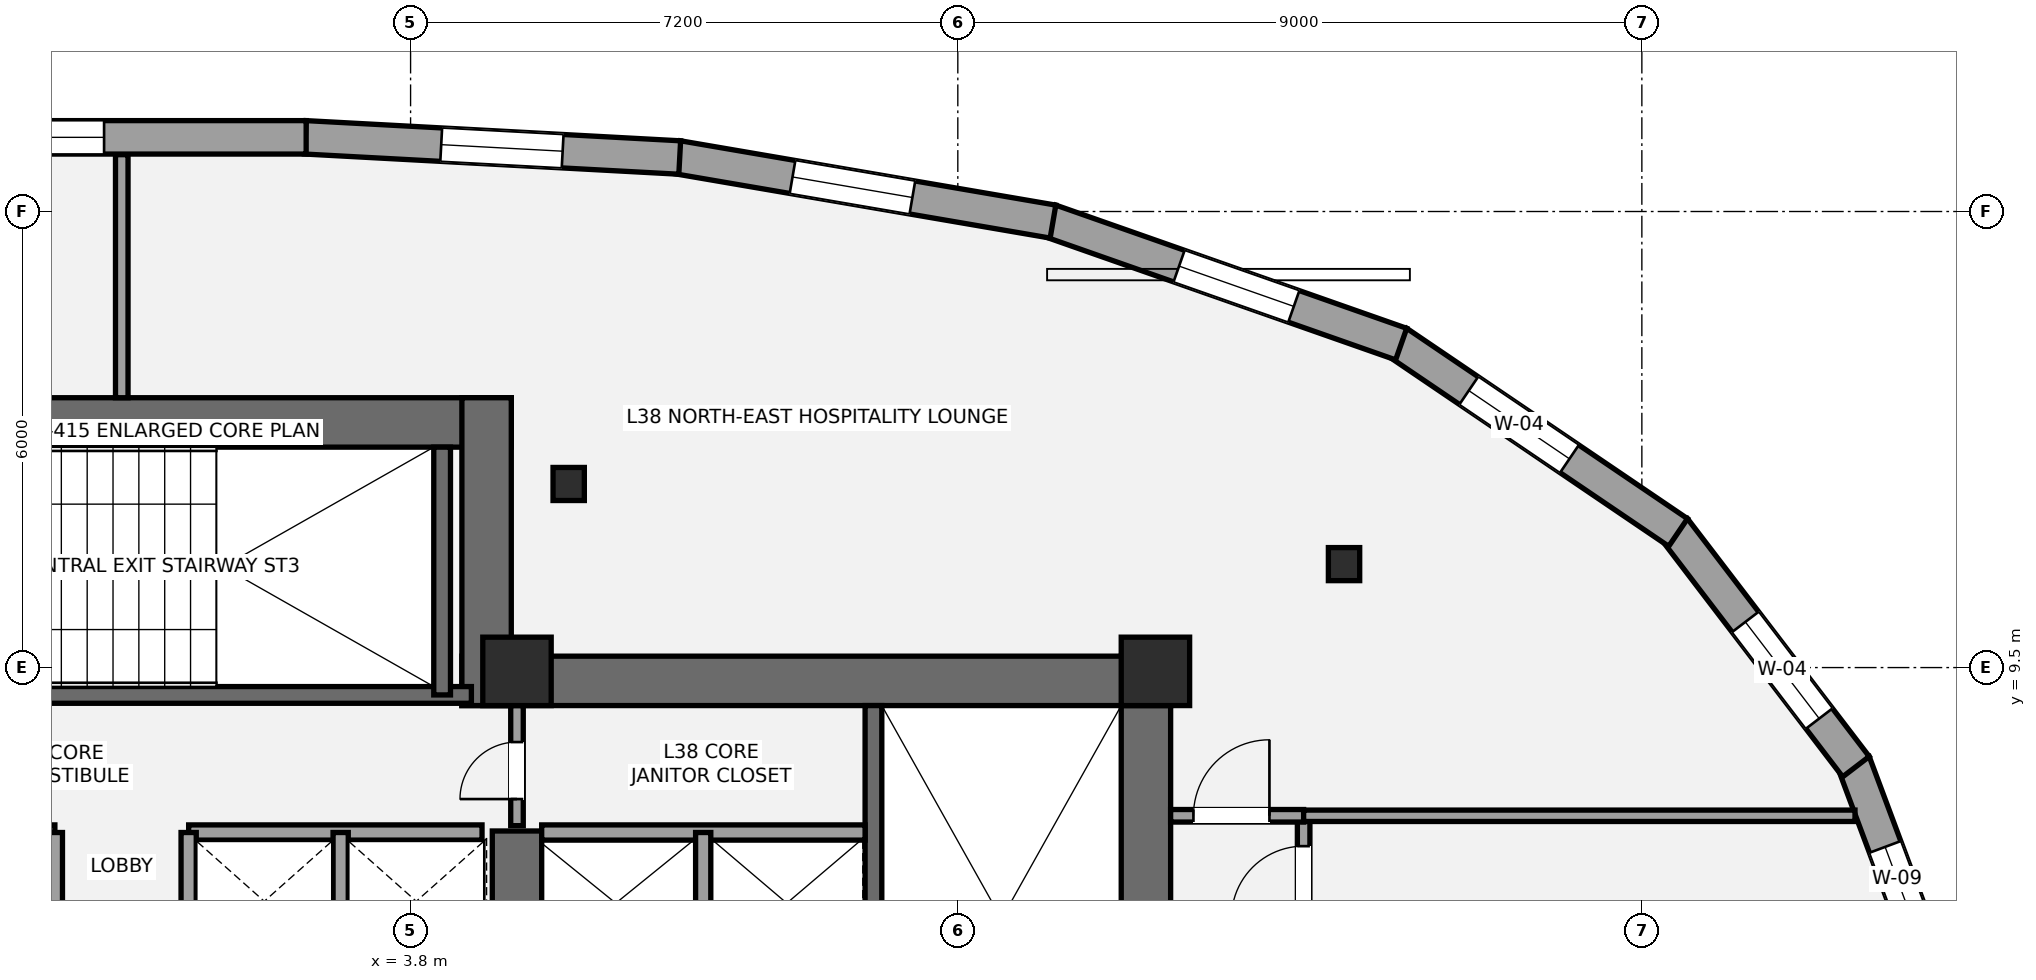
"""IFC4 building model, lengths in metres.
Left out: names, types, materials, properties, quantities, classifications, styles, units other than length and angle.
Written with IfcOpenShell. Run it as: python <this file> out.ifc"""

import sys

from ifc_helpers import new_model, si_unit, direction, frame, frame_2d, origin, origin_2d, place, context, subcontext, project, spatial, rectangle, i_section, extrude, element, fill, save


model = new_model("IFC4")
c1 = context("Model", 3, precision=1e-05, world=origin(), true_north=direction((0.0, 1.0)))
c2 = subcontext(c1, "Body", "Model", "MODEL_VIEW")
j1 = project(units=[si_unit("LENGTHUNIT", "METRE"), si_unit("PLANEANGLEUNIT", "RADIAN")], contexts=[c1])
p1 = place(None, origin())
s1 = spatial("IfcSite", under=j1, at=p1, CompositionType="ELEMENT")
p2 = place(p1, origin())
s2 = spatial("IfcBuilding", under=s1, at=p2, CompositionType="ELEMENT")
p3 = place(p2, frame((0.0, 0.0, 143.8)))
s3 = spatial("IfcBuildingStorey", under=s2, at=p3, CompositionType="ELEMENT", Elevation=143.8)
p4 = place(p3, frame((13.475, 1.2, 0.0), z_axis=(0.0, 0.0, 1.0), x_axis=(0.0, 1.0, 0.0)))
e1 = element("IfcWall", 1, at=p4, inside=s3, PredefinedType="SHEAR", context=c2, shape_type="SweptSolid", body=[
    extrude(rectangle(XDim=8.45, YDim=0.65, at=frame_2d((4.225, 0.0))), origin(), (0.0, 0.0, 1.0), 3.2),
])
p5 = place(p3, frame((4.475, 9.325, 0.0), z_axis=(0.0, 0.0, 1.0), x_axis=(1.0, 0.0, 0.0)))
e2 = element("IfcWall", 2, at=p5, inside=s3, PredefinedType="SHEAR", context=c2, shape_type="SweptSolid", body=[
    extrude(rectangle(XDim=9.325, YDim=0.65, at=frame_2d((4.663, 0.0))), origin(), (0.0, 0.0, 1.0), 3.2),
])
p6 = place(p3, frame((5.2, 5.35, 0.0), z_axis=(0.0, 0.0, 1.0), x_axis=(0.0, 1.0, 0.0)))
e3 = element("IfcWall", 3, at=p6, inside=s3, PredefinedType="SHEAR", context=c2, shape_type="SweptSolid", body=[
    extrude(rectangle(XDim=2.0, YDim=0.65, at=frame_2d((1.0, 0.0))), origin(), (0.0, 0.0, 1.0), 3.2),
])
p7 = place(p3, frame((9.89, 1.85, 0.0), z_axis=(0.0, 0.0, 1.0), x_axis=(0.0, 1.0, 0.0)))
e4 = element("IfcWall", 4, at=p7, inside=s3, PredefinedType="SHEAR", context=c2, shape_type="SweptSolid", body=[
    extrude(rectangle(XDim=7.15, YDim=0.22, at=frame_2d((3.575, 0.0))), origin(), (0.0, 0.0, 1.0), 3.2),
])
p8 = place(p3, frame((-5.125, 12.725, 0.0), z_axis=(0.0, 0.0, 1.0), x_axis=(1.0, 0.0, 0.0)))
e5 = element("IfcWall", 5, at=p8, inside=s3, PredefinedType="SHEAR", context=c2, shape_type="SweptSolid", body=[
    extrude(rectangle(XDim=10.25, YDim=0.65, at=frame_2d((5.125, 0.0))), origin(), (0.0, 0.0, 1.0), 3.2),
])
p9 = place(p3, frame((4.8, 9.0, 0.0), z_axis=(0.0, 0.0, 1.0), x_axis=(0.0, 1.0, 0.0)))
e6 = element("IfcWall", 6, at=p9, inside=s3, PredefinedType="SHEAR", context=c2, shape_type="SweptSolid", body=[
    extrude(rectangle(XDim=4.05, YDim=0.65, at=frame_2d((2.025, 0.0))), origin(), (0.0, 0.0, 1.0), 3.2),
])
p10 = place(p3, frame((-4.7, 9.14, 0.0), z_axis=(0.0, 0.0, 1.0), x_axis=(1.0, 0.0, 0.0)))
e7 = element("IfcWall", 7, at=p10, inside=s3, PredefinedType="SHEAR", context=c2, shape_type="SweptSolid", body=[
    extrude(rectangle(XDim=9.3, YDim=0.22, at=frame_2d((4.65, 0.0))), origin(), (0.0, 0.0, 1.0), 3.2),
])
p11 = place(p10, frame((1.15, 0.0, 0.0)))
e8 = element("IfcOpeningElement", 8, at=p11, cuts=e7, PredefinedType="OPENING", context=c2, shape_type="SweptSolid", body=[
    extrude(rectangle(XDim=1.05, YDim=2.15, at=frame_2d((0.525, 1.075))), frame((0.0, 0.12, 0.0), z_axis=(0.0, -1.0, 0.0), x_axis=(1.0, 0.0, 0.0)), (0.0, 0.0, 1.0), 0.24),
])
p12 = place(p3, frame((4.215, 9.14, 0.0), z_axis=(0.0, 0.0, 1.0), x_axis=(0.0, 1.0, 0.0)))
e9 = element("IfcWall", 9, at=p12, inside=s3, PredefinedType="SHEAR", context=c2, shape_type="SweptSolid", body=[
    extrude(rectangle(XDim=3.26, YDim=0.22, at=frame_2d((1.63, 0.0))), origin(), (0.0, 0.0, 1.0), 3.2),
])
for number, where, z_axis, x_axis in (
    (10, (5.2, 9.45, 0.0), (0.0, 0.0, 1.0), (1.0, 0.0, 0.0)),
    (11, (13.6, 9.45, 0.0), (0.0, 0.0, 1.0), (1.0, 0.0, 0.0)),
):
    element("IfcColumn", number, at=place(p3, frame(where, z_axis=z_axis, x_axis=x_axis)), inside=s3, PredefinedType="COLUMN", context=c2, shape_type="SweptSolid", body=[
        extrude(rectangle(XDim=0.9, YDim=0.9, at=origin_2d()), origin(), (0.0, 0.0, 1.0), 3.2),
    ])
for number, where, z_axis, x_axis in (
    (12, (16.082, 10.861, 0.0), (0.0, 0.0, 1.0), (1.0, 0.0, 0.0)),
    (13, (5.88, 11.915, 0.0), (0.0, 0.0, 1.0), (1.0, 0.0, 0.0)),
):
    element("IfcColumn", number, at=place(p3, frame(where, z_axis=z_axis, x_axis=x_axis)), inside=s3, PredefinedType="COLUMN", context=c2, shape_type="SweptSolid", body=[
        extrude(i_section(OverallWidth=0.412, OverallDepth=0.435, WebThickness=0.036, FlangeThickness=0.057, at=origin_2d()), origin(), (0.0, 0.0, 1.0), 3.2),
    ])
p13 = place(p3, frame((22.785, 8.253, 0.0), z_axis=(0.0, 0.0, 1.0), x_axis=(0.349422124021, -0.936965409844, 0.0)))
e14 = element("IfcWall", 14, at=p13, inside=s3, PredefinedType="STANDARD", context=c2, shape_type="SweptSolid", body=[
    extrude(rectangle(XDim=3.571, YDim=0.44, at=frame_2d((1.786, 0.0))), origin(), (0.0, 0.0, 1.0), 2.315),
])
p14 = place(p13, frame((1.188, 0.0, 0.58)))
e15 = element("IfcOpeningElement", 15, at=p14, cuts=e14, PredefinedType="OPENING", context=c2, shape_type="SweptSolid", body=[
    extrude(rectangle(XDim=0.9, YDim=1.35, at=frame_2d((0.45, 0.675))), frame((0.0, 0.23, 0.0), z_axis=(0.0, -1.0, 0.0), x_axis=(1.0, 0.0, 0.0)), (0.0, 0.0, 1.0), 0.46),
])
p15 = place(p3, frame((20.425, 11.326, 0.0), z_axis=(0.0, 0.0, 1.0), x_axis=(0.607215400231, -0.794537260122, 0.0)))
e16 = element("IfcWall", 16, at=p15, inside=s3, PredefinedType="STANDARD", context=c2, shape_type="SweptSolid", body=[
    extrude(rectangle(XDim=3.939, YDim=0.44, at=frame_2d((1.969, 0.0))), origin(), (0.0, 0.0, 1.0), 2.315),
])
p16 = place(p15, frame((1.542, 0.0, 0.58)))
e17 = element("IfcOpeningElement", 17, at=p16, cuts=e16, PredefinedType="OPENING", context=c2, shape_type="SweptSolid", body=[
    extrude(rectangle(XDim=1.6, YDim=1.55, at=frame_2d((0.8, 0.775))), frame((0.0, 0.23, 0.0), z_axis=(0.0, -1.0, 0.0), x_axis=(1.0, 0.0, 0.0)), (0.0, 0.0, 1.0), 0.46),
])
p17 = place(p3, frame((16.783, 13.781, 0.0), z_axis=(0.0, 0.0, 1.0), x_axis=(0.827741657842, -0.561109390291, 0.0)))
e18 = element("IfcWall", 18, at=p17, inside=s3, PredefinedType="STANDARD", context=c2, shape_type="SweptSolid", body=[
    extrude(rectangle(XDim=4.463, YDim=0.44, at=frame_2d((2.231, 0.0))), origin(), (0.0, 0.0, 1.0), 2.315),
])
p18 = place(p17, frame((1.136, 0.0, 0.58)))
e19 = element("IfcOpeningElement", 19, at=p18, cuts=e18, PredefinedType="OPENING", context=c2, shape_type="SweptSolid", body=[
    extrude(rectangle(XDim=1.6, YDim=1.55, at=frame_2d((0.8, 0.775))), frame((0.0, 0.23, 0.0), z_axis=(0.0, -1.0, 0.0), x_axis=(1.0, 0.0, 0.0)), (0.0, 0.0, 1.0), 0.46),
])
p19 = place(p3, frame((12.216, 15.377, 0.0), z_axis=(0.0, 0.0, 1.0), x_axis=(0.943528860281, -0.331290340662, 0.0)))
e20 = element("IfcWall", 20, at=p19, inside=s3, PredefinedType="STANDARD", context=c2, shape_type="SweptSolid", body=[
    extrude(rectangle(XDim=4.893, YDim=0.44, at=frame_2d((2.447, 0.0))), origin(), (0.0, 0.0, 1.0), 2.315),
])
p20 = place(p19, frame((1.796, 0.0, 0.58)))
e21 = element("IfcOpeningElement", 21, at=p20, cuts=e20, PredefinedType="OPENING", context=c2, shape_type="SweptSolid", body=[
    extrude(rectangle(XDim=1.6, YDim=1.55, at=frame_2d((0.8, 0.775))), frame((0.0, 0.23, 0.0), z_axis=(0.0, -1.0, 0.0), x_axis=(1.0, 0.0, 0.0)), (0.0, 0.0, 1.0), 0.46),
])
p21 = place(p3, frame((7.316, 16.213, 0.0), z_axis=(0.0, 0.0, 1.0), x_axis=(0.985640803986, -0.168855575915, 0.0)))
e22 = element("IfcWall", 22, at=p21, inside=s3, PredefinedType="STANDARD", context=c2, shape_type="SweptSolid", body=[
    extrude(rectangle(XDim=5.009, YDim=0.44, at=frame_2d((2.504, 0.0))), origin(), (0.0, 0.0, 1.0), 2.315),
])
p22 = place(p21, frame((1.531, 0.0, 0.58)))
e23 = element("IfcOpeningElement", 23, at=p22, cuts=e22, PredefinedType="OPENING", context=c2, shape_type="SweptSolid", body=[
    extrude(rectangle(XDim=1.6, YDim=1.55, at=frame_2d((0.8, 0.775))), frame((0.0, 0.23, 0.0), z_axis=(0.0, -1.0, 0.0), x_axis=(1.0, 0.0, 0.0)), (0.0, 0.0, 1.0), 0.46),
])
p23 = place(p3, frame((2.414, 16.476, 0.0), z_axis=(0.0, 0.0, 1.0), x_axis=(0.998547098553, -0.05388591627, 0.0)))
e24 = element("IfcWall", 24, at=p23, inside=s3, PredefinedType="STANDARD", context=c2, shape_type="SweptSolid", body=[
    extrude(rectangle(XDim=4.934, YDim=0.44, at=frame_2d((2.467, 0.0))), origin(), (0.0, 0.0, 1.0), 2.315),
])
p24 = place(p23, frame((1.792, 0.0, 0.58)))
e25 = element("IfcOpeningElement", 25, at=p24, cuts=e24, PredefinedType="OPENING", context=c2, shape_type="SweptSolid", body=[
    extrude(rectangle(XDim=1.6, YDim=1.55, at=frame_2d((0.8, 0.775))), frame((0.0, 0.23, 0.0), z_axis=(0.0, -1.0, 0.0), x_axis=(1.0, 0.0, 0.0)), (0.0, 0.0, 1.0), 0.46),
])
p25 = place(p3, frame((-2.426, 16.476, 0.0), z_axis=(0.0, 0.0, 1.0), x_axis=(1.0, 0.0, 0.0)))
e26 = element("IfcWall", 26, at=p25, inside=s3, PredefinedType="STANDARD", context=c2, shape_type="SweptSolid", body=[
    extrude(rectangle(XDim=4.852, YDim=0.44, at=frame_2d((2.426, 0.0))), origin(), (0.0, 0.0, 1.0), 2.315),
])
p26 = place(p25, frame((0.594, 0.0, 0.58)))
e27 = element("IfcOpeningElement", 27, at=p26, cuts=e26, PredefinedType="OPENING", context=c2, shape_type="SweptSolid", body=[
    extrude(rectangle(XDim=1.6, YDim=1.55, at=frame_2d((0.8, 0.775))), frame((0.0, 0.23, 0.0), z_axis=(0.0, -1.0, 0.0), x_axis=(1.0, 0.0, 0.0)), (0.0, 0.0, 1.0), 0.46),
])
p27 = place(p3, frame((5.525, 7.33, 0.0), z_axis=(0.0, 0.0, 1.0), x_axis=(1.0, 0.0, 0.0)))
e28 = element("IfcWall", 28, at=p27, inside=s3, PredefinedType="SOLIDWALL", context=c2, shape_type="SweptSolid", body=[
    extrude(rectangle(XDim=4.255, YDim=0.2, at=frame_2d((2.127, 0.0))), origin(), (0.0, 0.0, 1.0), 3.02),
])
p28 = place(p3, frame((7.65, 5.47, 0.0), z_axis=(0.0, 0.0, 1.0), x_axis=(0.0, 1.0, 0.0)))
e29 = element("IfcWall", 29, at=p28, inside=s3, PredefinedType="SOLIDWALL", context=c2, shape_type="SweptSolid", body=[
    extrude(rectangle(XDim=1.86, YDim=0.2, at=frame_2d((0.93, 0.0))), origin(), (0.0, 0.0, 1.0), 3.02),
])
for number, where, z_axis, x_axis in (
    (30, (-4.74, 7.33, 0.0), (0.0, 0.0, 1.0), (1.0, 0.0, 0.0)),
    (31, (0.88, 7.33, 0.0), (0.0, 0.0, 1.0), (1.0, 0.0, 0.0)),
):
    element("IfcWall", number, at=place(p3, frame(where, z_axis=z_axis, x_axis=x_axis)), inside=s3, PredefinedType="SOLIDWALL", context=c2, shape_type="SweptSolid", body=[
        extrude(rectangle(XDim=3.86, YDim=0.2, at=frame_2d((1.93, 0.0))), origin(), (0.0, 0.0, 1.0), 3.02),
    ])
for number, where, z_axis, x_axis in (
    (32, (2.88, 5.52, 0.0), (0.0, 0.0, 1.0), (0.0, 1.0, 0.0)),
    (33, (-0.88, 5.52, 0.0), (0.0, 0.0, 1.0), (0.0, 1.0, 0.0)),
    (34, (0.88, 5.52, 0.0), (0.0, 0.0, 1.0), (0.0, 1.0, 0.0)),
):
    element("IfcWall", number, at=place(p3, frame(where, z_axis=z_axis, x_axis=x_axis)), inside=s3, PredefinedType="SOLIDWALL", context=c2, shape_type="SweptSolid", body=[
        extrude(rectangle(XDim=1.81, YDim=0.2, at=frame_2d((0.905, 0.0))), origin(), (0.0, 0.0, 1.0), 3.02),
    ])
p29 = place(p3, frame((5.2, 7.42, 0.0), z_axis=(0.0, 0.0, 1.0), x_axis=(0.0, 1.0, 0.0)))
e35 = element("IfcWall", 35, at=p29, inside=s3, PredefinedType="PARTITIONING", context=c2, shape_type="SweptSolid", body=[
    extrude(rectangle(XDim=1.58, YDim=0.165, at=frame_2d((0.79, 0.0))), origin(), (0.0, 0.0, 1.0), 3.02),
])
p30 = place(p29, frame((0.35, 0.0, 0.0)))
e36 = element("IfcOpeningElement", 36, at=p30, cuts=e35, PredefinedType="OPENING", context=c2, shape_type="SweptSolid", body=[
    extrude(rectangle(XDim=0.75, YDim=2.1, at=frame_2d((0.375, 1.05))), frame((0.0, 0.093, 0.0), z_axis=(0.0, -1.0, 0.0), x_axis=(1.0, 0.0, 0.0)), (0.0, 0.0, 1.0), 0.185),
])
p31 = place(p3, frame((15.55, -13.965, 0.0), z_axis=(0.0, 0.0, 1.0), x_axis=(0.0, 1.0, 0.0)))
e37 = element("IfcWall", 37, at=p31, inside=s3, PredefinedType="PARTITIONING", context=c2, shape_type="SweptSolid", body=[
    extrude(rectangle(XDim=21.515, YDim=0.165, at=frame_2d((10.757, 0.0))), origin(), (0.0, 0.0, 1.0), 2.473),
])
p32 = place(p31, frame((6.964, 0.0, 0.0)))
e38 = element("IfcOpeningElement", 38, at=p32, cuts=e37, PredefinedType="OPENING", context=c2, shape_type="SweptSolid", body=[
    extrude(rectangle(XDim=0.85, YDim=2.1, at=frame_2d((0.425, 1.05))), frame((0.0, 0.093, 0.0), z_axis=(0.0, -1.0, 0.0), x_axis=(1.0, 0.0, 0.0)), (0.0, 0.0, 1.0), 0.185),
])
p33 = place(p31, frame((11.014, 0.0, 0.0)))
e39 = element("IfcOpeningElement", 39, at=p33, cuts=e37, PredefinedType="OPENING", context=c2, shape_type="SweptSolid", body=[
    extrude(rectangle(XDim=0.95, YDim=2.15, at=frame_2d((0.475, 1.075))), frame((0.0, 0.093, 0.0), z_axis=(0.0, -1.0, 0.0), x_axis=(1.0, 0.0, 0.0)), (0.0, 0.0, 1.0), 0.185),
])
p34 = place(p31, frame((15.414, 0.0, 0.0)))
e40 = element("IfcOpeningElement", 40, at=p34, cuts=e37, PredefinedType="OPENING", context=c2, shape_type="SweptSolid", body=[
    extrude(rectangle(XDim=0.95, YDim=2.15, at=frame_2d((0.475, 1.075))), frame((0.0, 0.093, 0.0), z_axis=(0.0, -1.0, 0.0), x_axis=(1.0, 0.0, 0.0)), (0.0, 0.0, 1.0), 0.185),
])
p35 = place(p31, frame((20.165, 0.0, 0.0)))
e41 = element("IfcOpeningElement", 41, at=p35, cuts=e37, PredefinedType="OPENING", context=c2, shape_type="SweptSolid", body=[
    extrude(rectangle(XDim=0.95, YDim=2.15, at=frame_2d((0.475, 1.075))), frame((0.0, 0.093, 0.0), z_axis=(0.0, -1.0, 0.0), x_axis=(1.0, 0.0, 0.0)), (0.0, 0.0, 1.0), 0.185),
])
p36 = place(p3, frame((13.8, 7.55, 0.0), z_axis=(0.0, 0.0, 1.0), x_axis=(1.0, 0.0, 0.0)))
e42 = element("IfcWall", 42, at=p36, inside=s3, PredefinedType="PARTITIONING", context=c2, shape_type="SweptSolid", body=[
    extrude(rectangle(XDim=1.75, YDim=0.165, at=frame_2d((0.875, 0.0))), origin(), (0.0, 0.0, 1.0), 2.473),
])
p37 = place(p36, frame((0.3, 0.0, 0.0)))
e43 = element("IfcOpeningElement", 43, at=p37, cuts=e42, PredefinedType="OPENING", context=c2, shape_type="SweptSolid", body=[
    extrude(rectangle(XDim=1.0, YDim=2.15, at=frame_2d((0.5, 1.075))), frame((0.0, 0.093, 0.0), z_axis=(0.0, -1.0, 0.0), x_axis=(1.0, 0.0, 0.0)), (0.0, 0.0, 1.0), 0.185),
])
p38 = place(p3, frame((15.55, 7.55, 0.0), z_axis=(0.0, 0.0, 1.0), x_axis=(1.0, 0.0, 0.0)))
e44 = element("IfcWall", 44, at=p38, inside=s3, PredefinedType="PLUMBINGWALL", context=c2, shape_type="SweptSolid", body=[
    extrude(rectangle(XDim=7.254, YDim=0.15, at=frame_2d((3.627, 0.0))), origin(), (0.0, 0.0, 1.0), 2.473),
])
p39 = place(p3, frame((0.0, 13.05, 0.0), z_axis=(0.0, 0.0, 1.0), x_axis=(0.0, 1.0, 0.0)))
e45 = element("IfcWall", 45, at=p39, inside=s3, PredefinedType="PARTITIONING", context=c2, shape_type="SweptSolid", body=[
    extrude(rectangle(XDim=3.198, YDim=0.165, at=frame_2d((1.599, 0.0))), origin(), (0.0, 0.0, 1.0), 3.02),
])
p40 = place(p14, origin())
e46 = element("IfcWindow", 46, at=p40, inside=s3, PartitioningType="SINGLE_PANEL", PredefinedType="WINDOW", context=c2, shape_type="SweptSolid", body=[
    extrude(rectangle(XDim=0.9, YDim=1.35, at=frame_2d((0.45, 0.675))), frame((0.0, -0.01, 0.0), z_axis=(0.0, -1.0, 0.0), x_axis=(1.0, 0.0, 0.0)), (0.0, 0.0, 1.0), 0.06),
])
fill(e15, e46)
p41 = place(p16, origin())
e47 = element("IfcWindow", 47, at=p41, inside=s3, PartitioningType="SINGLE_PANEL", PredefinedType="WINDOW", context=c2, shape_type="SweptSolid", body=[
    extrude(rectangle(XDim=1.6, YDim=1.55, at=frame_2d((0.8, 0.775))), frame((0.0, -0.01, 0.0), z_axis=(0.0, -1.0, 0.0), x_axis=(1.0, 0.0, 0.0)), (0.0, 0.0, 1.0), 0.06),
])
fill(e17, e47)
p42 = place(p18, origin())
e48 = element("IfcWindow", 48, at=p42, inside=s3, PartitioningType="SINGLE_PANEL", PredefinedType="WINDOW", context=c2, shape_type="SweptSolid", body=[
    extrude(rectangle(XDim=1.6, YDim=1.55, at=frame_2d((0.8, 0.775))), frame((0.0, -0.01, 0.0), z_axis=(0.0, -1.0, 0.0), x_axis=(1.0, 0.0, 0.0)), (0.0, 0.0, 1.0), 0.06),
])
fill(e19, e48)
p43 = place(p20, origin())
e49 = element("IfcWindow", 49, at=p43, inside=s3, PartitioningType="SINGLE_PANEL", PredefinedType="WINDOW", context=c2, shape_type="SweptSolid", body=[
    extrude(rectangle(XDim=1.6, YDim=1.55, at=frame_2d((0.8, 0.775))), frame((0.0, -0.01, 0.0), z_axis=(0.0, -1.0, 0.0), x_axis=(1.0, 0.0, 0.0)), (0.0, 0.0, 1.0), 0.06),
])
fill(e21, e49)
p44 = place(p22, origin())
e50 = element("IfcWindow", 50, at=p44, inside=s3, PartitioningType="SINGLE_PANEL", PredefinedType="WINDOW", context=c2, shape_type="SweptSolid", body=[
    extrude(rectangle(XDim=1.6, YDim=1.55, at=frame_2d((0.8, 0.775))), frame((0.0, -0.01, 0.0), z_axis=(0.0, -1.0, 0.0), x_axis=(1.0, 0.0, 0.0)), (0.0, 0.0, 1.0), 0.06),
])
fill(e23, e50)
p45 = place(p24, origin())
e51 = element("IfcWindow", 51, at=p45, inside=s3, PartitioningType="SINGLE_PANEL", PredefinedType="WINDOW", context=c2, shape_type="SweptSolid", body=[
    extrude(rectangle(XDim=1.6, YDim=1.55, at=frame_2d((0.8, 0.775))), frame((0.0, -0.01, 0.0), z_axis=(0.0, -1.0, 0.0), x_axis=(1.0, 0.0, 0.0)), (0.0, 0.0, 1.0), 0.06),
])
fill(e25, e51)
p46 = place(p26, origin())
e52 = element("IfcWindow", 52, at=p46, inside=s3, PartitioningType="SINGLE_PANEL", PredefinedType="WINDOW", context=c2, shape_type="SweptSolid", body=[
    extrude(rectangle(XDim=1.6, YDim=1.55, at=frame_2d((0.8, 0.775))), frame((0.0, -0.01, 0.0), z_axis=(0.0, -1.0, 0.0), x_axis=(1.0, 0.0, 0.0)), (0.0, 0.0, 1.0), 0.06),
])
fill(e27, e52)
p47 = place(p30, origin())
e53 = element("IfcDoor", 53, at=p47, inside=s3, OperationType="SINGLE_SWING_LEFT", PredefinedType="DOOR", context=c2, shape_type="SweptSolid", body=[
    extrude(rectangle(XDim=0.75, YDim=2.1, at=frame_2d((0.375, 1.05))), frame((0.0, 0.025, 0.0), z_axis=(0.0, -1.0, 0.0), x_axis=(1.0, 0.0, 0.0)), (0.0, 0.0, 1.0), 0.05),
])
fill(e36, e53)
p48 = place(p37, origin())
e54 = element("IfcDoor", 54, at=p48, inside=s3, OperationType="SINGLE_SWING_RIGHT", PredefinedType="DOOR", context=c2, shape_type="SweptSolid", body=[
    extrude(rectangle(XDim=1.0, YDim=2.15, at=frame_2d((0.5, 1.075))), frame((0.0, 0.025, 0.0), z_axis=(0.0, -1.0, 0.0), x_axis=(1.0, 0.0, 0.0)), (0.0, 0.0, 1.0), 0.05),
])
fill(e43, e54)
p49 = place(p35, origin())
e55 = element("IfcDoor", 55, at=p49, inside=s3, OperationType="SINGLE_SWING_LEFT", PredefinedType="DOOR", context=c2, shape_type="SweptSolid", body=[
    extrude(rectangle(XDim=0.95, YDim=2.15, at=frame_2d((0.475, 1.075))), frame((0.0, 0.025, 0.0), z_axis=(0.0, -1.0, 0.0), x_axis=(1.0, 0.0, 0.0)), (0.0, 0.0, 1.0), 0.05),
])
fill(e41, e55)
save(model, sys.argv[1])
